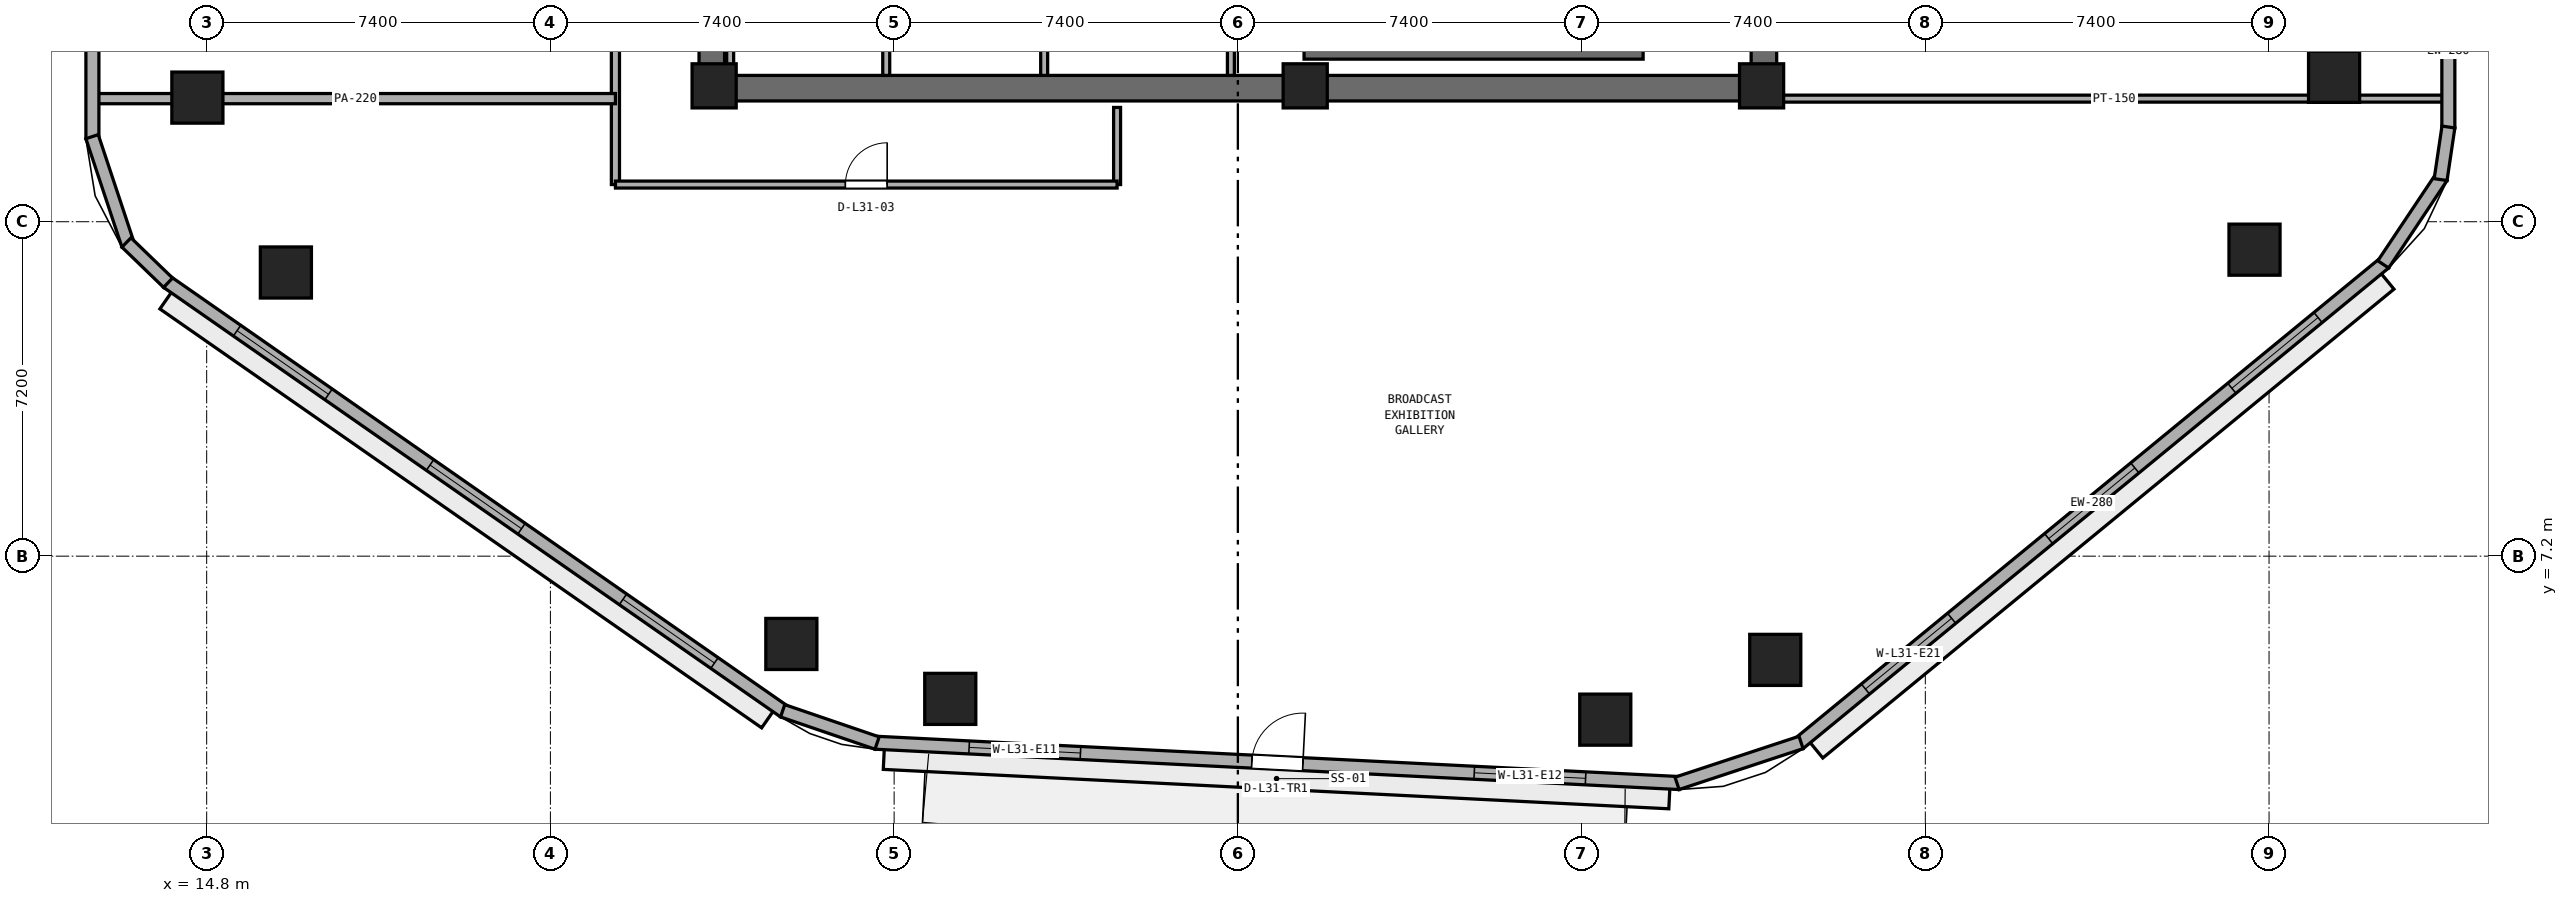
"""IFC4 building model, lengths in metres.
Left out: names, types, materials, properties, quantities, classifications, styles, units other than length and angle.
Written with IfcOpenShell. Run it as: python <this file> out.ifc"""

import sys

from ifc_helpers import new_model, si_unit, direction, frame, frame_2d, origin, origin_2d, place, context, subcontext, project, spatial, rectangle, extrude, element, fill, save


model = new_model("IFC4")
c1 = context("Model", 3, precision=1e-05, world=origin(), true_north=direction((0.0, 1.0)))
c2 = subcontext(c1, "Body", "Model", "MODEL_VIEW")
j1 = project(units=[si_unit("LENGTHUNIT", "METRE"), si_unit("PLANEANGLEUNIT", "RADIAN")], contexts=[c1])
p1 = place(None, origin())
s1 = spatial("IfcSite", under=j1, at=p1, CompositionType="ELEMENT")
p2 = place(p1, origin())
s2 = spatial("IfcBuilding", under=s1, at=p2, CompositionType="ELEMENT")
p3 = place(p2, frame((0.0, 0.0, 125.0)))
s3 = spatial("IfcBuildingStorey", under=s2, at=p3, CompositionType="ELEMENT", Elevation=125.0)
p4 = place(p3, frame((25.4, 17.275, 0.0), z_axis=(0.0, 0.0, 1.0), x_axis=(1.0, 0.0, 0.0)))
e1 = element("IfcWall", 1, at=p4, inside=s3, PredefinedType="SHEAR", context=c2, shape_type="SweptSolid", body=[
    extrude(rectangle(XDim=23.2, YDim=0.55, at=frame_2d((11.6, 0.0))), origin(), (0.0, 0.0, 1.0), 3.54),
])
p5 = place(p3, frame((25.675, 17.55, 0.0), z_axis=(0.0, 0.0, 1.0), x_axis=(0.0, 1.0, 0.0)))
e2 = element("IfcWall", 2, at=p5, inside=s3, PredefinedType="SHEAR", context=c2, shape_type="SweptSolid", body=[
    extrude(rectangle(XDim=15.3, YDim=0.55, at=frame_2d((7.65, 0.0))), origin(), (0.0, 0.0, 1.0), 3.54),
])
p6 = place(p5, frame((6.9, 0.0, 0.0)))
e3 = element("IfcOpeningElement", 3, at=p6, cuts=e2, PredefinedType="OPENING", context=c2, shape_type="SweptSolid", body=[
    extrude(rectangle(XDim=1.5, YDim=2.15, at=frame_2d((0.75, 1.075))), frame((0.0, 0.285, 0.0), z_axis=(0.0, -1.0, 0.0), x_axis=(1.0, 0.0, 0.0)), (0.0, 0.0, 1.0), 0.57),
])
p7 = place(p3, frame((48.325, 17.55, 0.0), z_axis=(0.0, 0.0, 1.0), x_axis=(0.0, 1.0, 0.0)))
e4 = element("IfcWall", 4, at=p7, inside=s3, PredefinedType="SHEAR", context=c2, shape_type="SweptSolid", body=[
    extrude(rectangle(XDim=15.3, YDim=0.55, at=frame_2d((7.65, 0.0))), origin(), (0.0, 0.0, 1.0), 3.54),
])
p8 = place(p7, frame((5.75, 0.0, 0.0)))
e5 = element("IfcOpeningElement", 5, at=p8, cuts=e4, PredefinedType="OPENING", context=c2, shape_type="SweptSolid", body=[
    extrude(rectangle(XDim=1.5, YDim=2.15, at=frame_2d((0.75, 1.075))), frame((0.0, 0.285, 0.0), z_axis=(0.0, -1.0, 0.0), x_axis=(1.0, 0.0, 0.0)), (0.0, 0.0, 1.0), 0.57),
])
for number, where, z_axis, x_axis in (
    (6, (25.725, 17.325, 0.0), (0.0, 0.0, 1.0), (1.0, 0.0, 0.0)),
    (7, (38.45, 17.325, 0.0), (0.0, 0.0, 1.0), (1.0, 0.0, 0.0)),
    (8, (48.275, 17.325, 0.0), (0.0, 0.0, 1.0), (1.0, 0.0, 0.0)),
):
    element("IfcColumn", number, at=place(p3, frame(where, z_axis=z_axis, x_axis=x_axis)), inside=s3, PredefinedType="PILASTER", context=c2, shape_type="SweptSolid", body=[
        extrude(rectangle(XDim=0.95, YDim=0.95, at=origin_2d()), origin(), (0.0, 0.0, 1.0), 3.8),
    ])
for number, where, z_axis, x_axis in (
    (9, (30.809, 4.127, 0.0), (0.0, 0.0, 1.0), (1.0, 0.0, 0.0)),
    (10, (44.91, 3.68, 0.0), (0.0, 0.0, 1.0), (1.0, 0.0, 0.0)),
    (11, (48.57, 4.967, 0.0), (0.0, 0.0, 1.0), (1.0, 0.0, 0.0)),
    (12, (58.887, 13.798, 0.0), (0.0, 0.0, 1.0), (1.0, 0.0, 0.0)),
    (13, (60.6, 17.519, 0.0), (0.0, 0.0, 1.0), (1.0, 0.0, 0.0)),
    (14, (14.6, 17.072, 0.0), (0.0, 0.0, 1.0), (1.0, 0.0, 0.0)),
    (15, (16.505, 13.307, 0.0), (0.0, 0.0, 1.0), (1.0, 0.0, 0.0)),
    (16, (27.387, 5.31, 0.0), (0.0, 0.0, 1.0), (1.0, 0.0, 0.0)),
):
    element("IfcColumn", number, at=place(p3, frame(where, z_axis=z_axis, x_axis=x_axis)), inside=s3, PredefinedType="COLUMN", context=c2, shape_type="SweptSolid", body=[
        extrude(rectangle(XDim=1.1, YDim=1.1, at=origin_2d()), origin(), (0.0, 0.0, 1.0), 3.8),
    ])
p9 = place(p3, frame((38.425, 18.025, 0.0), z_axis=(0.0, 0.0, 1.0), x_axis=(1.0, 0.0, 0.0)))
e17 = element("IfcWall", 17, at=p9, inside=s3, PredefinedType="SHEAR", context=c2, shape_type="SweptSolid", body=[
    extrude(rectangle(XDim=7.3, YDim=0.25, at=frame_2d((3.65, 0.0))), origin(), (0.0, 0.0, 1.0), 3.54),
])
p10 = place(p3, frame((26.07, 17.55, 0.0), z_axis=(0.0, 0.0, 1.0), x_axis=(0.0, 1.0, 0.0)))
e18 = element("IfcWall", 18, at=p10, inside=s3, PredefinedType="PARTITIONING", context=c2, shape_type="SweptSolid", body=[
    extrude(rectangle(XDim=2.2, YDim=0.15, at=frame_2d((1.1, 0.0))), origin(), (0.0, 0.0, 1.0), 2.64),
])
for number, where, z_axis, x_axis in (
    (19, (29.43, 17.55, 0.0), (0.0, 0.0, 1.0), (0.0, 1.0, 0.0)),
    (20, (32.83, 17.55, 0.0), (0.0, 0.0, 1.0), (0.0, 1.0, 0.0)),
    (21, (36.85, 17.55, 0.0), (0.0, 0.0, 1.0), (0.0, 1.0, 0.0)),
):
    element("IfcWall", number, at=place(p3, frame(where, z_axis=z_axis, x_axis=x_axis)), inside=s3, PredefinedType="PARTITIONING", context=c2, shape_type="SweptSolid", body=[
        extrude(rectangle(XDim=2.2, YDim=0.15, at=frame_2d((1.1, 0.0))), origin(), (0.0, 0.0, 1.0), 3.54),
    ])
p11 = place(p3, frame((34.4, 15.2, 0.0), z_axis=(0.0, 0.0, 1.0), x_axis=(0.0, 1.0, 0.0)))
e22 = element("IfcWall", 22, at=p11, inside=s3, PredefinedType="PARTITIONING", context=c2, shape_type="SweptSolid", body=[
    extrude(rectangle(XDim=1.66, YDim=0.15, at=frame_2d((0.83, 0.0))), origin(), (0.0, 0.0, 1.0), 3.54),
])
p12 = place(p3, frame((23.6, 15.2, 0.0), z_axis=(0.0, 0.0, 1.0), x_axis=(0.0, 1.0, 0.0)))
e23 = element("IfcWall", 23, at=p12, inside=s3, PredefinedType="PARTITIONING", context=c2, shape_type="SweptSolid", body=[
    extrude(rectangle(XDim=8.65, YDim=0.175, at=frame_2d((4.325, 0.0))), origin(), (0.0, 0.0, 1.0), 3.54),
])
p13 = place(p3, frame((23.6, 15.2, 0.0), z_axis=(0.0, 0.0, 1.0), x_axis=(1.0, 0.0, 0.0)))
e24 = element("IfcWall", 24, at=p13, inside=s3, PredefinedType="PARTITIONING", context=c2, shape_type="SweptSolid", body=[
    extrude(rectangle(XDim=10.8, YDim=0.15, at=frame_2d((5.4, 0.0))), origin(), (0.0, 0.0, 1.0), 3.54),
])
p14 = place(p13, frame((4.95, 0.0, 0.0)))
e25 = element("IfcOpeningElement", 25, at=p14, cuts=e24, PredefinedType="OPENING", context=c2, shape_type="SweptSolid", body=[
    extrude(rectangle(XDim=0.9, YDim=2.1, at=frame_2d((0.45, 1.05))), frame((0.0, 0.085, 0.0), z_axis=(0.0, -1.0, 0.0), x_axis=(1.0, 0.0, 0.0)), (0.0, 0.0, 1.0), 0.17),
])
p15 = place(p3, frame((12.405, 17.05, 0.0), z_axis=(0.0, 0.0, 1.0), x_axis=(1.0, 0.0, 0.0)))
e26 = element("IfcWall", 26, at=p15, inside=s3, PredefinedType="PARTITIONING", context=c2, shape_type="SweptSolid", body=[
    extrude(rectangle(XDim=11.195, YDim=0.22, at=frame_2d((5.598, 0.0))), origin(), (0.0, 0.0, 1.0), 2.79),
])
p16 = place(p3, frame((48.74, 17.05, 0.0), z_axis=(0.0, 0.0, 1.0), x_axis=(1.0, 0.0, 0.0)))
e27 = element("IfcWall", 27, at=p16, inside=s3, PredefinedType="PARTITIONING", context=c2, shape_type="SweptSolid", body=[
    extrude(rectangle(XDim=14.255, YDim=0.15, at=frame_2d((7.127, 0.0))), origin(), (0.0, 0.0, 1.0), 2.79),
])
p17 = place(p3, frame((29.195, 3.184, 0.0), z_axis=(0.0, 0.0, 1.0), x_axis=(0.998743400978, -0.05011605535, 0.0)))
e28 = element("IfcWall", 28, at=p17, inside=s3, PredefinedType="STANDARD", context=c2, shape_type="SweptSolid", body=[
    extrude(rectangle(XDim=17.333, YDim=0.28, at=frame_2d((8.667, 0.0))), origin(), (0.0, 0.0, 1.0), 3.54),
])
p18 = place(p17, frame((8.116, 0.0, 0.0)))
e29 = element("IfcOpeningElement", 29, at=p18, cuts=e28, PredefinedType="OPENING", context=c2, shape_type="SweptSolid", body=[
    extrude(rectangle(XDim=1.1, YDim=2.2, at=frame_2d((0.55, 1.1))), frame((0.0, 0.15, 0.0), z_axis=(0.0, -1.0, 0.0), x_axis=(1.0, 0.0, 0.0)), (0.0, 0.0, 1.0), 0.3),
])
p19 = place(p17, frame((2.022, 0.0, 0.9)))
e30 = element("IfcOpeningElement", 30, at=p19, cuts=e28, PredefinedType="OPENING", context=c2, shape_type="SweptSolid", body=[
    extrude(rectangle(XDim=2.4, YDim=1.75, at=frame_2d((1.2, 0.875))), frame((0.0, 0.15, 0.0), z_axis=(0.0, -1.0, 0.0), x_axis=(1.0, 0.0, 0.0)), (0.0, 0.0, 1.0), 0.3),
])
p20 = place(p17, frame((12.911, 0.0, 0.9)))
e31 = element("IfcOpeningElement", 31, at=p20, cuts=e28, PredefinedType="OPENING", context=c2, shape_type="SweptSolid", body=[
    extrude(rectangle(XDim=2.4, YDim=1.75, at=frame_2d((1.2, 0.875))), frame((0.0, 0.15, 0.0), z_axis=(0.0, -1.0, 0.0), x_axis=(1.0, 0.0, 0.0)), (0.0, 0.0, 1.0), 0.3),
])
p21 = place(p3, frame((49.08, 3.164, 0.0), z_axis=(0.0, 0.0, 1.0), x_axis=(0.772937830186, 0.634481765433, 0.0)))
e32 = element("IfcWall", 32, at=p21, inside=s3, PredefinedType="STANDARD", context=c2, shape_type="SweptSolid", body=[
    extrude(rectangle(XDim=16.309, YDim=0.28, at=frame_2d((8.154, 0.0))), origin(), (0.0, 0.0, 1.0), 3.54),
])
p22 = place(p21, frame((1.852, 0.0, 0.9)))
e33 = element("IfcOpeningElement", 33, at=p22, cuts=e32, PredefinedType="OPENING", context=c2, shape_type="SweptSolid", body=[
    extrude(rectangle(XDim=2.4, YDim=1.75, at=frame_2d((1.2, 0.875))), frame((0.0, 0.15, 0.0), z_axis=(0.0, -1.0, 0.0), x_axis=(1.0, 0.0, 0.0)), (0.0, 0.0, 1.0), 0.3),
])
p23 = place(p21, frame((6.954, 0.0, 0.9)))
e34 = element("IfcOpeningElement", 34, at=p23, cuts=e32, PredefinedType="OPENING", context=c2, shape_type="SweptSolid", body=[
    extrude(rectangle(XDim=2.4, YDim=1.75, at=frame_2d((1.2, 0.875))), frame((0.0, 0.15, 0.0), z_axis=(0.0, -1.0, 0.0), x_axis=(1.0, 0.0, 0.0)), (0.0, 0.0, 1.0), 0.3),
])
p24 = place(p21, frame((12.057, 0.0, 0.9)))
e35 = element("IfcOpeningElement", 35, at=p24, cuts=e32, PredefinedType="OPENING", context=c2, shape_type="SweptSolid", body=[
    extrude(rectangle(XDim=2.4, YDim=1.75, at=frame_2d((1.2, 0.875))), frame((0.0, 0.15, 0.0), z_axis=(0.0, -1.0, 0.0), x_axis=(1.0, 0.0, 0.0)), (0.0, 0.0, 1.0), 0.3),
])
p25 = place(p3, frame((63.06, 16.418, 0.0), z_axis=(0.0, 0.0, 1.0), x_axis=(0.0, 1.0, 0.0)))
e36 = element("IfcWall", 36, at=p25, inside=s3, PredefinedType="STANDARD", context=c2, shape_type="SweptSolid", body=[
    extrude(rectangle(XDim=3.332, YDim=0.28, at=frame_2d((1.666, 0.0))), origin(), (0.0, 0.0, 1.0), 3.54),
])
p26 = place(p3, frame((12.34, 22.13, 0.0), z_axis=(0.0, 0.0, 1.0), x_axis=(0.0, -1.0, 0.0)))
e37 = element("IfcWall", 37, at=p26, inside=s3, PredefinedType="STANDARD", context=c2, shape_type="SweptSolid", body=[
    extrude(rectangle(XDim=5.943, YDim=0.28, at=frame_2d((2.971, 0.0))), origin(), (0.0, 0.0, 1.0), 3.54),
])
p27 = place(p3, frame((13.952, 13.101, 0.0), z_axis=(0.0, 0.0, 1.0), x_axis=(0.820698239491, -0.571361881558, 0.0)))
e38 = element("IfcWall", 38, at=p27, inside=s3, PredefinedType="STANDARD", context=c2, shape_type="SweptSolid", body=[
    extrude(rectangle(XDim=16.186, YDim=0.28, at=frame_2d((8.093, 0.0))), origin(), (0.0, 0.0, 1.0), 3.54),
])
p28 = place(p27, frame((1.831, 0.0, 0.9)))
e39 = element("IfcOpeningElement", 39, at=p28, cuts=e38, PredefinedType="OPENING", context=c2, shape_type="SweptSolid", body=[
    extrude(rectangle(XDim=2.4, YDim=1.75, at=frame_2d((1.2, 0.875))), frame((0.0, 0.15, 0.0), z_axis=(0.0, -1.0, 0.0), x_axis=(1.0, 0.0, 0.0)), (0.0, 0.0, 1.0), 0.3),
])
p29 = place(p27, frame((6.893, 0.0, 0.9)))
e40 = element("IfcOpeningElement", 40, at=p29, cuts=e38, PredefinedType="OPENING", context=c2, shape_type="SweptSolid", body=[
    extrude(rectangle(XDim=2.4, YDim=1.75, at=frame_2d((1.2, 0.875))), frame((0.0, 0.15, 0.0), z_axis=(0.0, -1.0, 0.0), x_axis=(1.0, 0.0, 0.0)), (0.0, 0.0, 1.0), 0.3),
])
p30 = place(p27, frame((11.955, 0.0, 0.9)))
e41 = element("IfcOpeningElement", 41, at=p30, cuts=e38, PredefinedType="OPENING", context=c2, shape_type="SweptSolid", body=[
    extrude(rectangle(XDim=2.4, YDim=1.75, at=frame_2d((1.2, 0.875))), frame((0.0, 0.15, 0.0), z_axis=(0.0, -1.0, 0.0), x_axis=(1.0, 0.0, 0.0)), (0.0, 0.0, 1.0), 0.3),
])
p31 = place(p3, frame((46.455, 2.309, 0.0), z_axis=(0.0, 0.0, 1.0), x_axis=(0.949677222099, 0.313230224955, 0.0)))
e42 = element("IfcWall", 42, at=p31, inside=s3, PredefinedType="STANDARD", context=c2, shape_type="SweptSolid", body=[
    extrude(rectangle(XDim=2.811, YDim=0.28, at=frame_2d((1.406, 0.0))), origin(), (0.0, 0.0, 1.0), 3.54),
])
p32 = place(p3, frame((61.658, 13.482, 0.0), z_axis=(0.0, 0.0, 1.0), x_axis=(0.555521224344, 0.831502356764, 0.0)))
e43 = element("IfcWall", 43, at=p32, inside=s3, PredefinedType="STANDARD", context=c2, shape_type="SweptSolid", body=[
    extrude(rectangle(XDim=2.264, YDim=0.28, at=frame_2d((1.132, 0.0))), origin(), (0.0, 0.0, 1.0), 3.54),
])
p33 = place(p3, frame((62.894, 15.307, 0.0), z_axis=(0.0, 0.0, 1.0), x_axis=(0.146796104284, 0.989166772474, 0.0)))
e44 = element("IfcWall", 44, at=p33, inside=s3, PredefinedType="STANDARD", context=c2, shape_type="SweptSolid", body=[
    extrude(rectangle(XDim=1.144, YDim=0.28, at=frame_2d((0.572, 0.0))), origin(), (0.0, 0.0, 1.0), 3.54),
])
p34 = place(p3, frame((12.333, 16.231, 0.0), z_axis=(0.0, 0.0, 1.0), x_axis=(0.315364302967, -0.94897068259, 0.0)))
e45 = element("IfcWall", 45, at=p34, inside=s3, PredefinedType="STANDARD", context=c2, shape_type="SweptSolid", body=[
    extrude(rectangle(XDim=2.46, YDim=0.28, at=frame_2d((1.23, 0.0))), origin(), (0.0, 0.0, 1.0), 3.54),
])
p35 = place(p3, frame((13.073, 13.953, 0.0), z_axis=(0.0, 0.0, 1.0), x_axis=(0.718958999036, -0.695052485576, 0.0)))
e46 = element("IfcWall", 46, at=p35, inside=s3, PredefinedType="STANDARD", context=c2, shape_type="SweptSolid", body=[
    extrude(rectangle(XDim=1.246, YDim=0.28, at=frame_2d((0.623, 0.0))), origin(), (0.0, 0.0, 1.0), 3.54),
])
p36 = place(p3, frame((27.2, 3.871, 0.0), z_axis=(0.0, 0.0, 1.0), x_axis=(0.946327814955, -0.323208395068, 0.0)))
e47 = element("IfcWall", 47, at=p36, inside=s3, PredefinedType="STANDARD", context=c2, shape_type="SweptSolid", body=[
    extrude(rectangle(XDim=2.148, YDim=0.28, at=frame_2d((1.074, 0.0))), origin(), (0.0, 0.0, 1.0), 3.54),
])
p37 = place(p14, origin())
e48 = element("IfcDoor", 48, at=p37, inside=s3, OperationType="SINGLE_SWING_RIGHT", PredefinedType="DOOR", context=c2, shape_type="SweptSolid", body=[
    extrude(rectangle(XDim=0.9, YDim=2.1, at=frame_2d((0.45, 1.05))), frame((0.0, 0.025, 0.0), z_axis=(0.0, -1.0, 0.0), x_axis=(1.0, 0.0, 0.0)), (0.0, 0.0, 1.0), 0.05),
])
fill(e25, e48)
p38 = place(p18, origin())
e49 = element("IfcDoor", 49, at=p38, inside=s3, OperationType="SINGLE_SWING_RIGHT", PredefinedType="DOOR", context=c2, shape_type="SweptSolid", body=[
    extrude(rectangle(XDim=1.1, YDim=2.2, at=frame_2d((0.55, 1.1))), frame((0.0, 0.025, 0.0), z_axis=(0.0, -1.0, 0.0), x_axis=(1.0, 0.0, 0.0)), (0.0, 0.0, 1.0), 0.05),
])
fill(e29, e49)
p39 = place(p19, origin())
e50 = element("IfcWindow", 50, at=p39, inside=s3, PartitioningType="SINGLE_PANEL", PredefinedType="WINDOW", context=c2, shape_type="SweptSolid", body=[
    extrude(rectangle(XDim=2.4, YDim=1.75, at=frame_2d((1.2, 0.875))), frame((0.0, 0.03, 0.0), z_axis=(0.0, -1.0, 0.0), x_axis=(1.0, 0.0, 0.0)), (0.0, 0.0, 1.0), 0.06),
])
fill(e30, e50)
p40 = place(p20, origin())
e51 = element("IfcWindow", 51, at=p40, inside=s3, PartitioningType="SINGLE_PANEL", PredefinedType="WINDOW", context=c2, shape_type="SweptSolid", body=[
    extrude(rectangle(XDim=2.4, YDim=1.75, at=frame_2d((1.2, 0.875))), frame((0.0, 0.03, 0.0), z_axis=(0.0, -1.0, 0.0), x_axis=(1.0, 0.0, 0.0)), (0.0, 0.0, 1.0), 0.06),
])
fill(e31, e51)
p41 = place(p22, origin())
e52 = element("IfcWindow", 52, at=p41, inside=s3, PartitioningType="SINGLE_PANEL", PredefinedType="WINDOW", context=c2, shape_type="SweptSolid", body=[
    extrude(rectangle(XDim=2.4, YDim=1.75, at=frame_2d((1.2, 0.875))), frame((0.0, 0.03, 0.0), z_axis=(0.0, -1.0, 0.0), x_axis=(1.0, 0.0, 0.0)), (0.0, 0.0, 1.0), 0.06),
])
fill(e33, e52)
p42 = place(p23, origin())
e53 = element("IfcWindow", 53, at=p42, inside=s3, PartitioningType="SINGLE_PANEL", PredefinedType="WINDOW", context=c2, shape_type="SweptSolid", body=[
    extrude(rectangle(XDim=2.4, YDim=1.75, at=frame_2d((1.2, 0.875))), frame((0.0, 0.03, 0.0), z_axis=(0.0, -1.0, 0.0), x_axis=(1.0, 0.0, 0.0)), (0.0, 0.0, 1.0), 0.06),
])
fill(e34, e53)
p43 = place(p24, origin())
e54 = element("IfcWindow", 54, at=p43, inside=s3, PartitioningType="SINGLE_PANEL", PredefinedType="WINDOW", context=c2, shape_type="SweptSolid", body=[
    extrude(rectangle(XDim=2.4, YDim=1.75, at=frame_2d((1.2, 0.875))), frame((0.0, 0.03, 0.0), z_axis=(0.0, -1.0, 0.0), x_axis=(1.0, 0.0, 0.0)), (0.0, 0.0, 1.0), 0.06),
])
fill(e35, e54)
p44 = place(p28, origin())
e55 = element("IfcWindow", 55, at=p44, inside=s3, PartitioningType="SINGLE_PANEL", PredefinedType="WINDOW", context=c2, shape_type="SweptSolid", body=[
    extrude(rectangle(XDim=2.4, YDim=1.75, at=frame_2d((1.2, 0.875))), frame((0.0, 0.03, 0.0), z_axis=(0.0, -1.0, 0.0), x_axis=(1.0, 0.0, 0.0)), (0.0, 0.0, 1.0), 0.06),
])
fill(e39, e55)
p45 = place(p29, origin())
e56 = element("IfcWindow", 56, at=p45, inside=s3, PartitioningType="SINGLE_PANEL", PredefinedType="WINDOW", context=c2, shape_type="SweptSolid", body=[
    extrude(rectangle(XDim=2.4, YDim=1.75, at=frame_2d((1.2, 0.875))), frame((0.0, 0.03, 0.0), z_axis=(0.0, -1.0, 0.0), x_axis=(1.0, 0.0, 0.0)), (0.0, 0.0, 1.0), 0.06),
])
fill(e40, e56)
p46 = place(p30, origin())
e57 = element("IfcWindow", 57, at=p46, inside=s3, PartitioningType="SINGLE_PANEL", PredefinedType="WINDOW", context=c2, shape_type="SweptSolid", body=[
    extrude(rectangle(XDim=2.4, YDim=1.75, at=frame_2d((1.2, 0.875))), frame((0.0, 0.03, 0.0), z_axis=(0.0, -1.0, 0.0), x_axis=(1.0, 0.0, 0.0)), (0.0, 0.0, 1.0), 0.06),
])
fill(e41, e57)
save(model, sys.argv[1])
